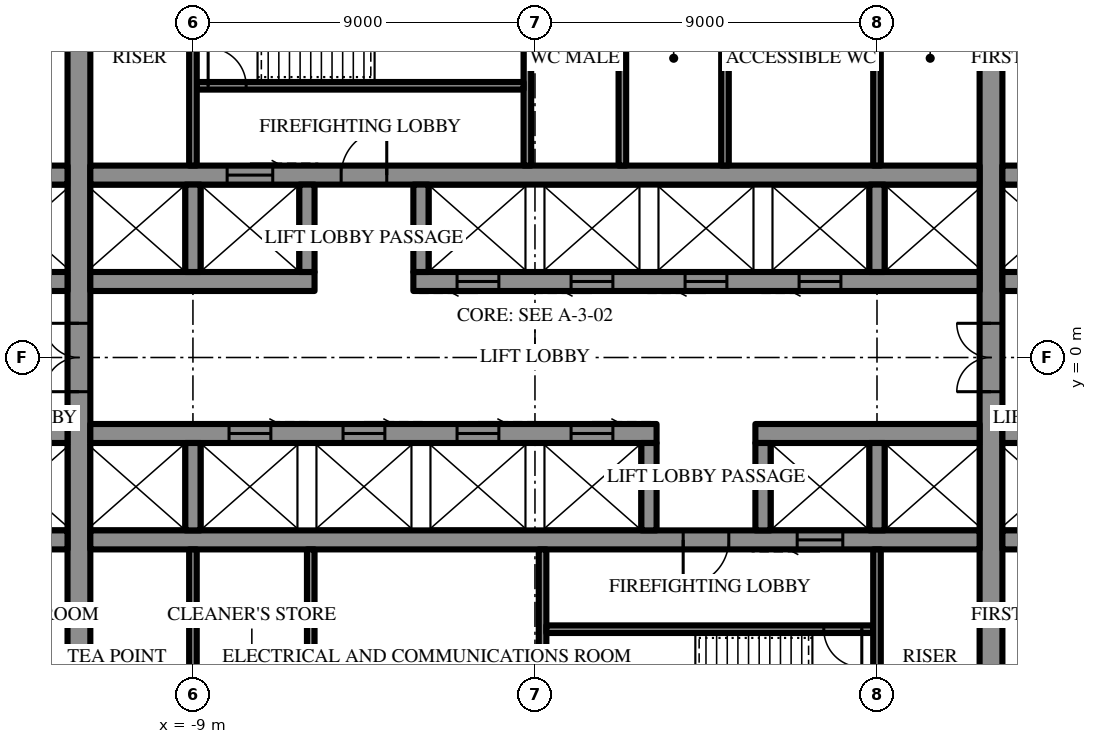
"""IFC4 building model, lengths in metres.
Left out: names, types, materials, properties, quantities, classifications, styles, units other than length and angle.
Written with IfcOpenShell. Run it as: python <this file> out.ifc"""

import sys

from ifc_helpers import new_model, si_unit, direction, frame, frame_2d, origin, place, context, subcontext, project, spatial, rectangle, extrude, element, fill, save


model = new_model("IFC4")
c1 = context("Model", 3, precision=1e-05, world=origin(), true_north=direction((0.0, 1.0)))
c2 = subcontext(c1, "Body", "Model", "MODEL_VIEW")
j1 = project(units=[si_unit("LENGTHUNIT", "METRE"), si_unit("PLANEANGLEUNIT", "RADIAN")], contexts=[c1])
p1 = place(None, origin())
s1 = spatial("IfcSite", under=j1, at=p1, CompositionType="ELEMENT")
p2 = place(p1, origin())
s2 = spatial("IfcBuilding", under=s1, at=p2, CompositionType="ELEMENT")
p3 = place(p2, frame((0.0, 0.0, 190.9)))
s3 = spatial("IfcBuildingStorey", under=s2, at=p3, CompositionType="ELEMENT", Elevation=190.9)
p4 = place(p3, frame((12.0, -10.7, 0.0), z_axis=(0.0, 0.0, 1.0), x_axis=(0.0, 1.0, 0.0)))
e1 = element("IfcWall", 1, at=p4, inside=s3, PredefinedType="SHEAR", context=c2, shape_type="SweptSolid", body=[
    extrude(rectangle(XDim=21.4, YDim=0.6, at=frame_2d((10.7, 0.0))), origin(), (0.0, 0.0, 1.0), 4.2),
])
p5 = place(p4, frame((9.8, 0.0, 0.0)))
e2 = element("IfcOpeningElement", 2, at=p5, cuts=e1, PredefinedType="OPENING", context=c2, shape_type="SweptSolid", body=[
    extrude(rectangle(XDim=1.8, YDim=2.4, at=frame_2d((0.9, 1.2))), frame((0.0, 0.31, 0.0), z_axis=(0.0, -1.0, 0.0), x_axis=(1.0, 0.0, 0.0)), (0.0, 0.0, 1.0), 0.62),
])
p6 = place(p3, frame((-12.0, -10.7, 0.0), z_axis=(0.0, 0.0, 1.0), x_axis=(0.0, 1.0, 0.0)))
e3 = element("IfcWall", 3, at=p6, inside=s3, PredefinedType="SHEAR", context=c2, shape_type="SweptSolid", body=[
    extrude(rectangle(XDim=21.4, YDim=0.6, at=frame_2d((10.7, 0.0))), origin(), (0.0, 0.0, 1.0), 4.2),
])
p7 = place(p6, frame((9.8, 0.0, 0.0)))
e4 = element("IfcOpeningElement", 4, at=p7, cuts=e3, PredefinedType="OPENING", context=c2, shape_type="SweptSolid", body=[
    extrude(rectangle(XDim=1.8, YDim=2.4, at=frame_2d((0.9, 1.2))), frame((0.0, 0.31, 0.0), z_axis=(0.0, -1.0, 0.0), x_axis=(1.0, 0.0, 0.0)), (0.0, 0.0, 1.0), 0.62),
])
p8 = place(p3, frame((-14.7, 2.0, 0.0), z_axis=(0.0, 0.0, 1.0), x_axis=(1.0, 0.0, 0.0)))
e5 = element("IfcWall", 5, at=p8, inside=s3, PredefinedType="SHEAR", context=c2, shape_type="SweptSolid", body=[
    extrude(rectangle(XDim=2.4, YDim=0.5, at=frame_2d((1.2, 0.0))), origin(), (0.0, 0.0, 1.0), 4.2),
])
p9 = place(p3, frame((-11.7, 2.0, 0.0), z_axis=(0.0, 0.0, 1.0), x_axis=(1.0, 0.0, 0.0)))
e6 = element("IfcWall", 6, at=p9, inside=s3, PredefinedType="SHEAR", context=c2, shape_type="SweptSolid", body=[
    extrude(rectangle(XDim=5.9, YDim=0.5, at=frame_2d((2.95, 0.0))), origin(), (0.0, 0.0, 1.0), 4.2),
])
p10 = place(p3, frame((-3.2, 2.0, 0.0), z_axis=(0.0, 0.0, 1.0), x_axis=(1.0, 0.0, 0.0)))
e7 = element("IfcWall", 7, at=p10, inside=s3, PredefinedType="SHEAR", context=c2, shape_type="SweptSolid", body=[
    extrude(rectangle(XDim=14.9, YDim=0.5, at=frame_2d((7.45, 0.0))), origin(), (0.0, 0.0, 1.0), 4.2),
])
p11 = place(p10, frame((1.15, 0.0, 0.0)))
e8 = element("IfcOpeningElement", 8, at=p11, cuts=e7, PredefinedType="OPENING", context=c2, shape_type="SweptSolid", body=[
    extrude(rectangle(XDim=1.1, YDim=2.2, at=frame_2d((0.55, 1.1))), frame((0.0, 0.26, 0.0), z_axis=(0.0, -1.0, 0.0), x_axis=(1.0, 0.0, 0.0)), (0.0, 0.0, 1.0), 0.52),
])
p12 = place(p10, frame((4.15, 0.0, 0.0)))
e9 = element("IfcOpeningElement", 9, at=p12, cuts=e7, PredefinedType="OPENING", context=c2, shape_type="SweptSolid", body=[
    extrude(rectangle(XDim=1.1, YDim=2.2, at=frame_2d((0.55, 1.1))), frame((0.0, 0.26, 0.0), z_axis=(0.0, -1.0, 0.0), x_axis=(1.0, 0.0, 0.0)), (0.0, 0.0, 1.0), 0.52),
])
p13 = place(p10, frame((7.15, 0.0, 0.0)))
e10 = element("IfcOpeningElement", 10, at=p13, cuts=e7, PredefinedType="OPENING", context=c2, shape_type="SweptSolid", body=[
    extrude(rectangle(XDim=1.1, YDim=2.2, at=frame_2d((0.55, 1.1))), frame((0.0, 0.26, 0.0), z_axis=(0.0, -1.0, 0.0), x_axis=(1.0, 0.0, 0.0)), (0.0, 0.0, 1.0), 0.52),
])
p14 = place(p10, frame((10.15, 0.0, 0.0)))
e11 = element("IfcOpeningElement", 11, at=p14, cuts=e7, PredefinedType="OPENING", context=c2, shape_type="SweptSolid", body=[
    extrude(rectangle(XDim=1.1, YDim=2.2, at=frame_2d((0.55, 1.1))), frame((0.0, 0.26, 0.0), z_axis=(0.0, -1.0, 0.0), x_axis=(1.0, 0.0, 0.0)), (0.0, 0.0, 1.0), 0.52),
])
for number, where, z_axis, x_axis in (
    (12, (12.3, 2.0, 0.0), (0.0, 0.0, 1.0), (1.0, 0.0, 0.0)),
    (13, (-14.7, 4.8, 0.0), (0.0, 0.0, 1.0), (1.0, 0.0, 0.0)),
):
    element("IfcWall", number, at=place(p3, frame(where, z_axis=z_axis, x_axis=x_axis)), inside=s3, PredefinedType="SHEAR", context=c2, shape_type="SweptSolid", body=[
        extrude(rectangle(XDim=2.4, YDim=0.5, at=frame_2d((1.2, 0.0))), origin(), (0.0, 0.0, 1.0), 4.2),
    ])
p15 = place(p3, frame((-11.7, 4.8, 0.0), z_axis=(0.0, 0.0, 1.0), x_axis=(1.0, 0.0, 0.0)))
e14 = element("IfcWall", 14, at=p15, inside=s3, PredefinedType="SHEAR", context=c2, shape_type="SweptSolid", body=[
    extrude(rectangle(XDim=23.4, YDim=0.5, at=frame_2d((11.7, 0.0))), origin(), (0.0, 0.0, 1.0), 4.2),
])
p16 = place(p15, frame((6.6, 0.0, 0.0)))
e15 = element("IfcOpeningElement", 15, at=p16, cuts=e14, PredefinedType="OPENING", context=c2, shape_type="SweptSolid", body=[
    extrude(rectangle(XDim=1.2, YDim=2.2, at=frame_2d((0.6, 1.1))), frame((0.0, 0.26, 0.0), z_axis=(0.0, -1.0, 0.0), x_axis=(1.0, 0.0, 0.0)), (0.0, 0.0, 1.0), 0.52),
])
p17 = place(p15, frame((3.6, 0.0, 0.0)))
e16 = element("IfcOpeningElement", 16, at=p17, cuts=e14, PredefinedType="OPENING", context=c2, shape_type="SweptSolid", body=[
    extrude(rectangle(XDim=1.2, YDim=2.2, at=frame_2d((0.6, 1.1))), frame((0.0, 0.26, 0.0), z_axis=(0.0, -1.0, 0.0), x_axis=(1.0, 0.0, 0.0)), (0.0, 0.0, 1.0), 0.52),
])
p18 = place(p3, frame((12.3, 4.8, 0.0), z_axis=(0.0, 0.0, 1.0), x_axis=(1.0, 0.0, 0.0)))
e17 = element("IfcWall", 17, at=p18, inside=s3, PredefinedType="SHEAR", context=c2, shape_type="SweptSolid", body=[
    extrude(rectangle(XDim=2.4, YDim=0.5, at=frame_2d((1.2, 0.0))), origin(), (0.0, 0.0, 1.0), 4.2),
])
for number, where, z_axis, x_axis in (
    (18, (-9.0, 2.25, 0.0), (0.0, 0.0, 1.0), (0.0, 1.0, 0.0)),
    (19, (-6.0, 2.25, 0.0), (0.0, 0.0, 1.0), (0.0, 1.0, 0.0)),
    (20, (-3.0, 2.25, 0.0), (0.0, 0.0, 1.0), (0.0, 1.0, 0.0)),
    (21, (9.0, 2.25, 0.0), (0.0, 0.0, 1.0), (0.0, 1.0, 0.0)),
):
    element("IfcWall", number, at=place(p3, frame(where, z_axis=z_axis, x_axis=x_axis)), inside=s3, PredefinedType="SHEAR", context=c2, shape_type="SweptSolid", body=[
        extrude(rectangle(XDim=2.3, YDim=0.4, at=frame_2d((1.15, 0.0))), origin(), (0.0, 0.0, 1.0), 4.2),
    ])
p19 = place(p3, frame((-0.2, 5.05, 0.0), z_axis=(0.0, 0.0, 1.0), x_axis=(0.0, 1.0, 0.0)))
e22 = element("IfcWall", 22, at=p19, inside=s3, PredefinedType="SHEAR", context=c2, shape_type="SweptSolid", body=[
    extrude(rectangle(XDim=5.65, YDim=0.2, at=frame_2d((2.825, 0.0))), origin(), (0.0, 0.0, 1.0), 4.2),
])
p20 = place(p3, frame((-8.9, 7.15, 0.0), z_axis=(0.0, 0.0, 1.0), x_axis=(1.0, 0.0, 0.0)))
e23 = element("IfcWall", 23, at=p20, inside=s3, PredefinedType="SHEAR", context=c2, shape_type="SweptSolid", body=[
    extrude(rectangle(XDim=8.6, YDim=0.2, at=frame_2d((4.3, 0.0))), origin(), (0.0, 0.0, 1.0), 4.2),
])
p21 = place(p20, frame((0.3, 0.0, 0.0)))
e24 = element("IfcOpeningElement", 24, at=p21, cuts=e23, PredefinedType="OPENING", context=c2, shape_type="SweptSolid", body=[
    extrude(rectangle(XDim=1.0, YDim=2.2, at=frame_2d((0.5, 1.1))), frame((0.0, 0.11, 0.0), z_axis=(0.0, -1.0, 0.0), x_axis=(1.0, 0.0, 0.0)), (0.0, 0.0, 1.0), 0.22),
])
p22 = place(p3, frame((14.7, -2.0, 0.0), z_axis=(0.0, 0.0, 1.0), x_axis=(-1.0, 0.0, 0.0)))
e25 = element("IfcWall", 25, at=p22, inside=s3, PredefinedType="SHEAR", context=c2, shape_type="SweptSolid", body=[
    extrude(rectangle(XDim=2.4, YDim=0.5, at=frame_2d((1.2, 0.0))), origin(), (0.0, 0.0, 1.0), 4.2),
])
p23 = place(p3, frame((11.7, -2.0, 0.0), z_axis=(0.0, 0.0, 1.0), x_axis=(-1.0, 0.0, 0.0)))
e26 = element("IfcWall", 26, at=p23, inside=s3, PredefinedType="SHEAR", context=c2, shape_type="SweptSolid", body=[
    extrude(rectangle(XDim=5.9, YDim=0.5, at=frame_2d((2.95, 0.0))), origin(), (0.0, 0.0, 1.0), 4.2),
])
p24 = place(p3, frame((3.2, -2.0, 0.0), z_axis=(0.0, 0.0, 1.0), x_axis=(-1.0, 0.0, 0.0)))
e27 = element("IfcWall", 27, at=p24, inside=s3, PredefinedType="SHEAR", context=c2, shape_type="SweptSolid", body=[
    extrude(rectangle(XDim=14.9, YDim=0.5, at=frame_2d((7.45, 0.0))), origin(), (0.0, 0.0, 1.0), 4.2),
])
p25 = place(p24, frame((1.15, 0.0, 0.0)))
e28 = element("IfcOpeningElement", 28, at=p25, cuts=e27, PredefinedType="OPENING", context=c2, shape_type="SweptSolid", body=[
    extrude(rectangle(XDim=1.1, YDim=2.2, at=frame_2d((0.55, 1.1))), frame((0.0, 0.26, 0.0), z_axis=(0.0, -1.0, 0.0), x_axis=(1.0, 0.0, 0.0)), (0.0, 0.0, 1.0), 0.52),
])
p26 = place(p24, frame((4.15, 0.0, 0.0)))
e29 = element("IfcOpeningElement", 29, at=p26, cuts=e27, PredefinedType="OPENING", context=c2, shape_type="SweptSolid", body=[
    extrude(rectangle(XDim=1.1, YDim=2.2, at=frame_2d((0.55, 1.1))), frame((0.0, 0.26, 0.0), z_axis=(0.0, -1.0, 0.0), x_axis=(1.0, 0.0, 0.0)), (0.0, 0.0, 1.0), 0.52),
])
p27 = place(p24, frame((7.15, 0.0, 0.0)))
e30 = element("IfcOpeningElement", 30, at=p27, cuts=e27, PredefinedType="OPENING", context=c2, shape_type="SweptSolid", body=[
    extrude(rectangle(XDim=1.1, YDim=2.2, at=frame_2d((0.55, 1.1))), frame((0.0, 0.26, 0.0), z_axis=(0.0, -1.0, 0.0), x_axis=(1.0, 0.0, 0.0)), (0.0, 0.0, 1.0), 0.52),
])
p28 = place(p24, frame((10.15, 0.0, 0.0)))
e31 = element("IfcOpeningElement", 31, at=p28, cuts=e27, PredefinedType="OPENING", context=c2, shape_type="SweptSolid", body=[
    extrude(rectangle(XDim=1.1, YDim=2.2, at=frame_2d((0.55, 1.1))), frame((0.0, 0.26, 0.0), z_axis=(0.0, -1.0, 0.0), x_axis=(1.0, 0.0, 0.0)), (0.0, 0.0, 1.0), 0.52),
])
for number, where, z_axis, x_axis in (
    (32, (-12.3, -2.0, 0.0), (0.0, 0.0, 1.0), (-1.0, 0.0, 0.0)),
    (33, (14.7, -4.8, 0.0), (0.0, 0.0, 1.0), (-1.0, 0.0, 0.0)),
):
    element("IfcWall", number, at=place(p3, frame(where, z_axis=z_axis, x_axis=x_axis)), inside=s3, PredefinedType="SHEAR", context=c2, shape_type="SweptSolid", body=[
        extrude(rectangle(XDim=2.4, YDim=0.5, at=frame_2d((1.2, 0.0))), origin(), (0.0, 0.0, 1.0), 4.2),
    ])
p29 = place(p3, frame((11.7, -4.8, 0.0), z_axis=(0.0, 0.0, 1.0), x_axis=(-1.0, 0.0, 0.0)))
e34 = element("IfcWall", 34, at=p29, inside=s3, PredefinedType="SHEAR", context=c2, shape_type="SweptSolid", body=[
    extrude(rectangle(XDim=23.4, YDim=0.5, at=frame_2d((11.7, 0.0))), origin(), (0.0, 0.0, 1.0), 4.2),
])
p30 = place(p29, frame((6.6, 0.0, 0.0)))
e35 = element("IfcOpeningElement", 35, at=p30, cuts=e34, PredefinedType="OPENING", context=c2, shape_type="SweptSolid", body=[
    extrude(rectangle(XDim=1.2, YDim=2.2, at=frame_2d((0.6, 1.1))), frame((0.0, 0.26, 0.0), z_axis=(0.0, -1.0, 0.0), x_axis=(1.0, 0.0, 0.0)), (0.0, 0.0, 1.0), 0.52),
])
p31 = place(p29, frame((3.6, 0.0, 0.0)))
e36 = element("IfcOpeningElement", 36, at=p31, cuts=e34, PredefinedType="OPENING", context=c2, shape_type="SweptSolid", body=[
    extrude(rectangle(XDim=1.2, YDim=2.2, at=frame_2d((0.6, 1.1))), frame((0.0, 0.26, 0.0), z_axis=(0.0, -1.0, 0.0), x_axis=(1.0, 0.0, 0.0)), (0.0, 0.0, 1.0), 0.52),
])
p32 = place(p3, frame((-12.3, -4.8, 0.0), z_axis=(0.0, 0.0, 1.0), x_axis=(-1.0, 0.0, 0.0)))
e37 = element("IfcWall", 37, at=p32, inside=s3, PredefinedType="SHEAR", context=c2, shape_type="SweptSolid", body=[
    extrude(rectangle(XDim=2.4, YDim=0.5, at=frame_2d((1.2, 0.0))), origin(), (0.0, 0.0, 1.0), 4.2),
])
for number, where, z_axis, x_axis in (
    (38, (9.0, -2.25, 0.0), (0.0, 0.0, 1.0), (0.0, -1.0, 0.0)),
    (39, (6.0, -2.25, 0.0), (0.0, 0.0, 1.0), (0.0, -1.0, 0.0)),
    (40, (3.0, -2.25, 0.0), (0.0, 0.0, 1.0), (0.0, -1.0, 0.0)),
    (41, (-9.0, -2.25, 0.0), (0.0, 0.0, 1.0), (0.0, -1.0, 0.0)),
):
    element("IfcWall", number, at=place(p3, frame(where, z_axis=z_axis, x_axis=x_axis)), inside=s3, PredefinedType="SHEAR", context=c2, shape_type="SweptSolid", body=[
        extrude(rectangle(XDim=2.3, YDim=0.4, at=frame_2d((1.15, 0.0))), origin(), (0.0, 0.0, 1.0), 4.2),
    ])
p33 = place(p3, frame((0.2, -5.05, 0.0), z_axis=(0.0, 0.0, 1.0), x_axis=(0.0, -1.0, 0.0)))
e42 = element("IfcWall", 42, at=p33, inside=s3, PredefinedType="SHEAR", context=c2, shape_type="SweptSolid", body=[
    extrude(rectangle(XDim=5.65, YDim=0.2, at=frame_2d((2.825, 0.0))), origin(), (0.0, 0.0, 1.0), 4.2),
])
p34 = place(p3, frame((8.9, -7.15, 0.0), z_axis=(0.0, 0.0, 1.0), x_axis=(-1.0, 0.0, 0.0)))
e43 = element("IfcWall", 43, at=p34, inside=s3, PredefinedType="SHEAR", context=c2, shape_type="SweptSolid", body=[
    extrude(rectangle(XDim=8.6, YDim=0.2, at=frame_2d((4.3, 0.0))), origin(), (0.0, 0.0, 1.0), 4.2),
])
p35 = place(p34, frame((0.3, 0.0, 0.0)))
e44 = element("IfcOpeningElement", 44, at=p35, cuts=e43, PredefinedType="OPENING", context=c2, shape_type="SweptSolid", body=[
    extrude(rectangle(XDim=1.0, YDim=2.2, at=frame_2d((0.5, 1.1))), frame((0.0, 0.11, 0.0), z_axis=(0.0, -1.0, 0.0), x_axis=(1.0, 0.0, 0.0)), (0.0, 0.0, 1.0), 0.22),
])
for number, where, z_axis, x_axis in (
    (45, (-9.0, 5.05, 0.0), (0.0, 0.0, 1.0), (0.0, 1.0, 0.0)),
    (46, (9.0, 5.05, 0.0), (0.0, 0.0, 1.0), (0.0, 1.0, 0.0)),
    (47, (2.3, 5.05, 0.0), (0.0, 0.0, 1.0), (0.0, 1.0, 0.0)),
    (48, (5.0, 5.05, 0.0), (0.0, 0.0, 1.0), (0.0, 1.0, 0.0)),
    (49, (9.0, -5.05, 0.0), (0.0, 0.0, 1.0), (0.0, -1.0, 0.0)),
    (50, (-9.0, -5.05, 0.0), (0.0, 0.0, 1.0), (0.0, -1.0, 0.0)),
    (51, (-5.9, -5.05, 0.0), (0.0, 0.0, 1.0), (0.0, -1.0, 0.0)),
):
    element("IfcWall", number, at=place(p3, frame(where, z_axis=z_axis, x_axis=x_axis)), inside=s3, PredefinedType="PARTITIONING", context=c2, shape_type="SweptSolid", body=[
        extrude(rectangle(XDim=5.65, YDim=0.2, at=frame_2d((2.825, 0.0))), origin(), (0.0, 0.0, 1.0), 4.0),
    ])
p36 = place(p16, origin())
e52 = element("IfcDoor", 52, at=p36, inside=s3, OperationType="SINGLE_SWING_LEFT", PredefinedType="DOOR", context=c2, shape_type="SweptSolid", body=[
    extrude(rectangle(XDim=1.2, YDim=2.2, at=frame_2d((0.6, 1.1))), frame((0.0, 0.025, 0.0), z_axis=(0.0, -1.0, 0.0), x_axis=(1.0, 0.0, 0.0)), (0.0, 0.0, 1.0), 0.05),
])
fill(e15, e52)
p37 = place(p21, origin())
e53 = element("IfcDoor", 53, at=p37, inside=s3, OperationType="SINGLE_SWING_RIGHT", PredefinedType="DOOR", context=c2, shape_type="SweptSolid", body=[
    extrude(rectangle(XDim=1.0, YDim=2.2, at=frame_2d((0.5, 1.1))), frame((0.0, 0.025, 0.0), z_axis=(0.0, -1.0, 0.0), x_axis=(1.0, 0.0, 0.0)), (0.0, 0.0, 1.0), 0.05),
])
fill(e24, e53)
p38 = place(p30, origin())
e54 = element("IfcDoor", 54, at=p38, inside=s3, OperationType="SINGLE_SWING_LEFT", PredefinedType="DOOR", context=c2, shape_type="SweptSolid", body=[
    extrude(rectangle(XDim=1.2, YDim=2.2, at=frame_2d((0.6, 1.1))), frame((0.0, 0.025, 0.0), z_axis=(0.0, -1.0, 0.0), x_axis=(1.0, 0.0, 0.0)), (0.0, 0.0, 1.0), 0.05),
])
fill(e35, e54)
p39 = place(p35, origin())
e55 = element("IfcDoor", 55, at=p39, inside=s3, OperationType="SINGLE_SWING_RIGHT", PredefinedType="DOOR", context=c2, shape_type="SweptSolid", body=[
    extrude(rectangle(XDim=1.0, YDim=2.2, at=frame_2d((0.5, 1.1))), frame((0.0, 0.025, 0.0), z_axis=(0.0, -1.0, 0.0), x_axis=(1.0, 0.0, 0.0)), (0.0, 0.0, 1.0), 0.05),
])
fill(e44, e55)
p40 = place(p5, origin())
e56 = element("IfcDoor", 56, at=p40, inside=s3, OperationType="DOUBLE_DOOR_SINGLE_SWING", PredefinedType="DOOR", context=c2, shape_type="SweptSolid", body=[
    extrude(rectangle(XDim=1.8, YDim=2.4, at=frame_2d((0.9, 1.2))), frame((0.0, 0.025, 0.0), z_axis=(0.0, -1.0, 0.0), x_axis=(1.0, 0.0, 0.0)), (0.0, 0.0, 1.0), 0.05),
])
fill(e2, e56)
p41 = place(p7, origin())
e57 = element("IfcDoor", 57, at=p41, inside=s3, OperationType="DOUBLE_DOOR_SINGLE_SWING", PredefinedType="DOOR", context=c2, shape_type="SweptSolid", body=[
    extrude(rectangle(XDim=1.8, YDim=2.4, at=frame_2d((0.9, 1.2))), frame((0.0, 0.025, 0.0), z_axis=(0.0, -1.0, 0.0), x_axis=(1.0, 0.0, 0.0)), (0.0, 0.0, 1.0), 0.05),
])
fill(e4, e57)
p42 = place(p17, origin())
e58 = element("IfcDoor", 58, at=p42, inside=s3, OperationType="SLIDING_TO_LEFT", PredefinedType="DOOR", context=c2, shape_type="SweptSolid", body=[
    extrude(rectangle(XDim=1.2, YDim=2.2, at=frame_2d((0.6, 1.1))), frame((0.0, 0.025, 0.0), z_axis=(0.0, -1.0, 0.0), x_axis=(1.0, 0.0, 0.0)), (0.0, 0.0, 1.0), 0.05),
])
fill(e16, e58)
p43 = place(p11, frame((1.1, 0.0, 0.0), z_axis=(0.0, 0.0, 1.0), x_axis=(-1.0, 0.0, 0.0)))
e59 = element("IfcDoor", 59, at=p43, inside=s3, OperationType="SLIDING_TO_LEFT", PredefinedType="DOOR", context=c2, shape_type="SweptSolid", body=[
    extrude(rectangle(XDim=1.1, YDim=2.2, at=frame_2d((0.55, 1.1))), frame((0.0, 0.025, 0.0), z_axis=(0.0, -1.0, 0.0), x_axis=(1.0, 0.0, 0.0)), (0.0, 0.0, 1.0), 0.05),
])
fill(e8, e59)
p44 = place(p12, frame((1.1, 0.0, 0.0), z_axis=(0.0, 0.0, 1.0), x_axis=(-1.0, 0.0, 0.0)))
e60 = element("IfcDoor", 60, at=p44, inside=s3, OperationType="SLIDING_TO_LEFT", PredefinedType="DOOR", context=c2, shape_type="SweptSolid", body=[
    extrude(rectangle(XDim=1.1, YDim=2.2, at=frame_2d((0.55, 1.1))), frame((0.0, 0.025, 0.0), z_axis=(0.0, -1.0, 0.0), x_axis=(1.0, 0.0, 0.0)), (0.0, 0.0, 1.0), 0.05),
])
fill(e9, e60)
p45 = place(p13, frame((1.1, 0.0, 0.0), z_axis=(0.0, 0.0, 1.0), x_axis=(-1.0, 0.0, 0.0)))
e61 = element("IfcDoor", 61, at=p45, inside=s3, OperationType="SLIDING_TO_LEFT", PredefinedType="DOOR", context=c2, shape_type="SweptSolid", body=[
    extrude(rectangle(XDim=1.1, YDim=2.2, at=frame_2d((0.55, 1.1))), frame((0.0, 0.025, 0.0), z_axis=(0.0, -1.0, 0.0), x_axis=(1.0, 0.0, 0.0)), (0.0, 0.0, 1.0), 0.05),
])
fill(e10, e61)
p46 = place(p14, frame((1.1, 0.0, 0.0), z_axis=(0.0, 0.0, 1.0), x_axis=(-1.0, 0.0, 0.0)))
e62 = element("IfcDoor", 62, at=p46, inside=s3, OperationType="SLIDING_TO_LEFT", PredefinedType="DOOR", context=c2, shape_type="SweptSolid", body=[
    extrude(rectangle(XDim=1.1, YDim=2.2, at=frame_2d((0.55, 1.1))), frame((0.0, 0.025, 0.0), z_axis=(0.0, -1.0, 0.0), x_axis=(1.0, 0.0, 0.0)), (0.0, 0.0, 1.0), 0.05),
])
fill(e11, e62)
p47 = place(p31, origin())
e63 = element("IfcDoor", 63, at=p47, inside=s3, OperationType="SLIDING_TO_LEFT", PredefinedType="DOOR", context=c2, shape_type="SweptSolid", body=[
    extrude(rectangle(XDim=1.2, YDim=2.2, at=frame_2d((0.6, 1.1))), frame((0.0, 0.025, 0.0), z_axis=(0.0, -1.0, 0.0), x_axis=(1.0, 0.0, 0.0)), (0.0, 0.0, 1.0), 0.05),
])
fill(e36, e63)
p48 = place(p25, frame((1.1, 0.0, 0.0), z_axis=(0.0, 0.0, 1.0), x_axis=(-1.0, 0.0, 0.0)))
e64 = element("IfcDoor", 64, at=p48, inside=s3, OperationType="SLIDING_TO_LEFT", PredefinedType="DOOR", context=c2, shape_type="SweptSolid", body=[
    extrude(rectangle(XDim=1.1, YDim=2.2, at=frame_2d((0.55, 1.1))), frame((0.0, 0.025, 0.0), z_axis=(0.0, -1.0, 0.0), x_axis=(1.0, 0.0, 0.0)), (0.0, 0.0, 1.0), 0.05),
])
fill(e28, e64)
p49 = place(p26, frame((1.1, 0.0, 0.0), z_axis=(0.0, 0.0, 1.0), x_axis=(-1.0, 0.0, 0.0)))
e65 = element("IfcDoor", 65, at=p49, inside=s3, OperationType="SLIDING_TO_LEFT", PredefinedType="DOOR", context=c2, shape_type="SweptSolid", body=[
    extrude(rectangle(XDim=1.1, YDim=2.2, at=frame_2d((0.55, 1.1))), frame((0.0, 0.025, 0.0), z_axis=(0.0, -1.0, 0.0), x_axis=(1.0, 0.0, 0.0)), (0.0, 0.0, 1.0), 0.05),
])
fill(e29, e65)
p50 = place(p27, frame((1.1, 0.0, 0.0), z_axis=(0.0, 0.0, 1.0), x_axis=(-1.0, 0.0, 0.0)))
e66 = element("IfcDoor", 66, at=p50, inside=s3, OperationType="SLIDING_TO_LEFT", PredefinedType="DOOR", context=c2, shape_type="SweptSolid", body=[
    extrude(rectangle(XDim=1.1, YDim=2.2, at=frame_2d((0.55, 1.1))), frame((0.0, 0.025, 0.0), z_axis=(0.0, -1.0, 0.0), x_axis=(1.0, 0.0, 0.0)), (0.0, 0.0, 1.0), 0.05),
])
fill(e30, e66)
p51 = place(p28, frame((1.1, 0.0, 0.0), z_axis=(0.0, 0.0, 1.0), x_axis=(-1.0, 0.0, 0.0)))
e67 = element("IfcDoor", 67, at=p51, inside=s3, OperationType="SLIDING_TO_LEFT", PredefinedType="DOOR", context=c2, shape_type="SweptSolid", body=[
    extrude(rectangle(XDim=1.1, YDim=2.2, at=frame_2d((0.55, 1.1))), frame((0.0, 0.025, 0.0), z_axis=(0.0, -1.0, 0.0), x_axis=(1.0, 0.0, 0.0)), (0.0, 0.0, 1.0), 0.05),
])
fill(e31, e67)
save(model, sys.argv[1])
